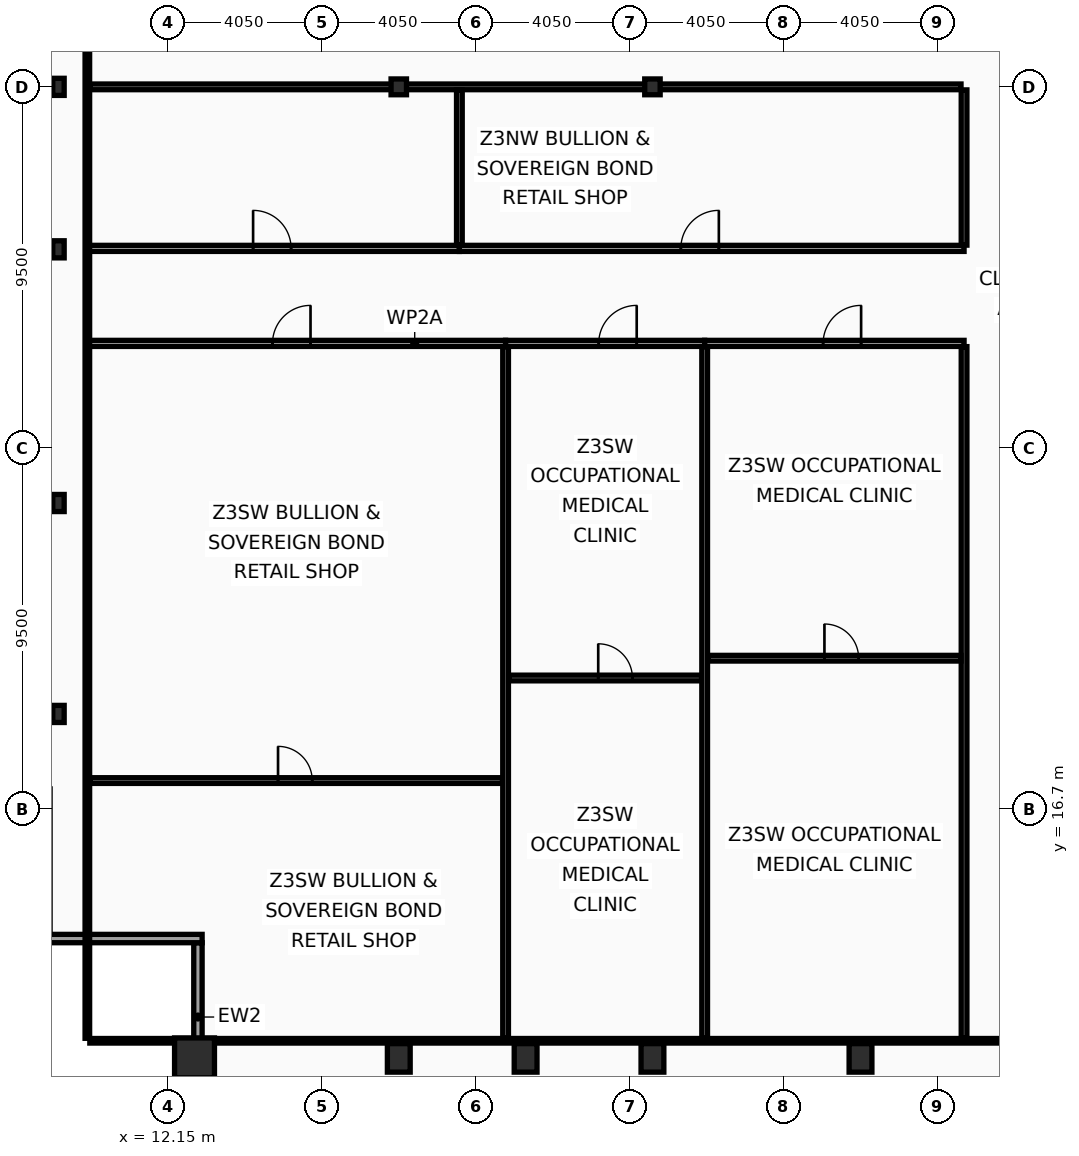
"""IFC4 building model, lengths in metres.
Left out: names, types, materials, properties, quantities, classifications, styles, units other than length and angle.
Written with IfcOpenShell. Run it as: python <this file> out.ifc"""

import sys

from ifc_helpers import new_model, si_unit, direction, frame, frame_2d, origin, origin_2d, place, context, subcontext, project, spatial, rectangle, hollow_rectangle, i_section, extrude, element, fill, save


model = new_model("IFC4")
c1 = context("Model", 3, precision=1e-05, world=origin(), true_north=direction((0.0, 1.0)))
c2 = subcontext(c1, "Body", "Model", "MODEL_VIEW")
j1 = project(units=[si_unit("LENGTHUNIT", "METRE"), si_unit("PLANEANGLEUNIT", "RADIAN")], contexts=[c1])
p1 = place(None, origin())
s1 = spatial("IfcSite", under=j1, at=p1, CompositionType="ELEMENT")
p2 = place(p1, origin())
s2 = spatial("IfcBuilding", under=s1, at=p2, CompositionType="ELEMENT")
p3 = place(p2, frame((0.0, 0.0, 253.4)))
s3 = spatial("IfcBuildingStorey", under=s2, at=p3, CompositionType="ELEMENT", Elevation=253.4)
p4 = place(p3, frame((12.85, 10.15, 0.0), z_axis=(0.0, 0.0, 1.0), x_axis=(1.0, 0.0, 0.0)))
e1 = element("IfcColumn", 1, at=p4, inside=s3, PredefinedType="COLUMN", context=c2, shape_type="SweptSolid", body=[
    extrude(hollow_rectangle(XDim=1.05, YDim=1.05, WallThickness=0.055, at=origin_2d()), origin(), (0.0, 0.0, 1.0), 3.6),
])
for number, where, z_axis, x_axis in (
    (2, (18.225, 10.15, 0.0), (0.0, 0.0, 1.0), (1.0, 0.0, 0.0)),
    (3, (21.562, 10.15, 0.0), (0.0, 0.0, 1.0), (1.0, 0.0, 0.0)),
    (4, (24.9, 10.15, 0.0), (0.0, 0.0, 1.0), (1.0, 0.0, 0.0)),
    (5, (30.375, 10.15, 0.0), (0.0, 0.0, 1.0), (1.0, 0.0, 0.0)),
):
    element("IfcColumn", number, at=place(p3, frame(where, z_axis=z_axis, x_axis=x_axis)), inside=s3, PredefinedType="COLUMN", context=c2, shape_type="SweptSolid", body=[
        extrude(hollow_rectangle(XDim=0.6, YDim=0.75, WallThickness=0.045, at=origin_2d()), origin(), (0.0, 0.0, 1.0), 3.6),
    ])
for number, where, z_axis, x_axis in (
    (6, (9.27, 19.2, 0.0), (0.0, 0.0, 1.0), (1.0, 0.0, 0.0)),
    (7, (9.27, 24.75, 0.0), (0.0, 0.0, 1.0), (1.0, 0.0, 0.0)),
    (8, (9.27, 31.425, 0.0), (0.0, 0.0, 1.0), (1.0, 0.0, 0.0)),
    (9, (9.27, 35.7, 0.0), (0.0, 0.0, 1.0), (1.0, 0.0, 0.0)),
):
    element("IfcColumn", number, at=place(p3, frame(where, z_axis=z_axis, x_axis=x_axis)), inside=s3, PredefinedType="COLUMN", context=c2, shape_type="SweptSolid", body=[
        extrude(i_section(OverallWidth=0.3, OverallDepth=0.45, WebThickness=0.014, FlangeThickness=0.026, at=origin_2d()), origin(), (0.0, 0.0, 1.0), 3.6),
    ])
for number, where, z_axis, x_axis in (
    (10, (18.225, 35.7, 0.0), (0.0, 0.0, 1.0), (1.0, 0.0, 0.0)),
    (11, (24.9, 35.7, 0.0), (0.0, 0.0, 1.0), (1.0, 0.0, 0.0)),
):
    element("IfcColumn", number, at=place(p3, frame(where, z_axis=z_axis, x_axis=x_axis)), inside=s3, PredefinedType="COLUMN", context=c2, shape_type="SweptSolid", body=[
        extrude(i_section(OverallWidth=0.406, OverallDepth=0.416, WebThickness=0.03, FlangeThickness=0.048, at=origin_2d()), origin(), (0.0, 0.0, 1.0), 3.6),
    ])
p5 = place(p3, frame((12.94, 9.27, 0.0), z_axis=(0.0, 0.0, 1.0), x_axis=(0.0, 1.0, 0.0)))
e12 = element("IfcWall", 12, at=p5, inside=s3, PredefinedType="SOLIDWALL", context=c2, shape_type="SweptSolid", body=[
    extrude(rectangle(XDim=3.91, YDim=0.22, at=frame_2d((1.955, 0.0))), origin(), (0.0, 0.0, 1.0), 2.77),
])
p6 = place(p3, frame((13.05, 13.29, 0.0), z_axis=(0.0, 0.0, 1.0), x_axis=(-1.0, 0.0, 0.0)))
e13 = element("IfcWall", 13, at=p6, inside=s3, PredefinedType="SOLIDWALL", context=c2, shape_type="SweptSolid", body=[
    extrude(rectangle(XDim=4.22, YDim=0.22, at=frame_2d((2.11, 0.0))), origin(), (0.0, 0.0, 1.0), 2.77),
])
p7 = place(p3, frame((33.1, 10.665, 0.0), z_axis=(0.0, 0.0, 1.0), x_axis=(0.0, 1.0, 0.0)))
e14 = element("IfcWall", 14, at=p7, inside=s3, PredefinedType="PARTITIONING", context=c2, shape_type="SweptSolid", body=[
    extrude(rectangle(XDim=18.2, YDim=0.15, at=frame_2d((9.1, 0.0))), origin(), (0.0, 0.0, 1.0), 2.97),
])
p8 = place(p3, frame((33.1, 31.535, 0.0), z_axis=(0.0, 0.0, 1.0), x_axis=(0.0, 1.0, 0.0)))
e15 = element("IfcWall", 15, at=p8, inside=s3, PredefinedType="PARTITIONING", context=c2, shape_type="SweptSolid", body=[
    extrude(rectangle(XDim=4.085, YDim=0.15, at=frame_2d((2.042, 0.0))), origin(), (0.0, 0.0, 1.0), 2.97),
])
p9 = place(p3, frame((10.095, 35.7, 0.0), z_axis=(0.0, 0.0, 1.0), x_axis=(1.0, 0.0, 0.0)))
e16 = element("IfcWall", 16, at=p9, inside=s3, PredefinedType="PARTITIONING", context=c2, shape_type="SweptSolid", body=[
    extrude(rectangle(XDim=22.925, YDim=0.15, at=frame_2d((11.462, 0.0))), origin(), (0.0, 0.0, 1.0), 2.72),
])
p10 = place(p3, frame((10.03, 28.95, 0.0), z_axis=(0.0, 0.0, 1.0), x_axis=(1.0, 0.0, 0.0)))
e17 = element("IfcWall", 17, at=p10, inside=s3, PredefinedType="PARTITIONING", context=c2, shape_type="SweptSolid", body=[
    extrude(rectangle(XDim=11.006, YDim=0.16, at=frame_2d((5.503, 0.0))), origin(), (0.0, 0.0, 1.0), 2.72),
])
p11 = place(p10, frame((4.873, 0.0, 0.0)))
e18 = element("IfcOpeningElement", 18, at=p11, cuts=e17, PredefinedType="OPENING", context=c2, shape_type="SweptSolid", body=[
    extrude(rectangle(XDim=1.0, YDim=2.05, at=frame_2d((0.5, 1.025))), frame((0.0, 0.09, 0.0), z_axis=(0.0, -1.0, 0.0), x_axis=(1.0, 0.0, 0.0)), (0.0, 0.0, 1.0), 0.18),
])
p12 = place(p3, frame((10.095, 17.447, 0.0), z_axis=(0.0, 0.0, 1.0), x_axis=(1.0, 0.0, 0.0)))
e19 = element("IfcWall", 19, at=p12, inside=s3, PredefinedType="PARTITIONING", context=c2, shape_type="SweptSolid", body=[
    extrude(rectangle(XDim=10.861, YDim=0.15, at=frame_2d((5.43, 0.0))), origin(), (0.0, 0.0, 1.0), 2.72),
])
p13 = place(p12, frame((4.953, 0.0, 0.0)))
e20 = element("IfcOpeningElement", 20, at=p13, cuts=e19, PredefinedType="OPENING", context=c2, shape_type="SweptSolid", body=[
    extrude(rectangle(XDim=0.9, YDim=2.05, at=frame_2d((0.45, 1.025))), frame((0.0, 0.085, 0.0), z_axis=(0.0, -1.0, 0.0), x_axis=(1.0, 0.0, 0.0)), (0.0, 0.0, 1.0), 0.17),
])
p14 = place(p3, frame((21.036, 28.95, 0.0), z_axis=(0.0, 0.0, 1.0), x_axis=(1.0, 0.0, 0.0)))
e21 = element("IfcWall", 21, at=p14, inside=s3, PredefinedType="PARTITIONING", context=c2, shape_type="SweptSolid", body=[
    extrude(rectangle(XDim=5.238, YDim=0.16, at=frame_2d((2.619, 0.0))), origin(), (0.0, 0.0, 1.0), 2.72),
])
p15 = place(p14, frame((2.45, 0.0, 0.0)))
e22 = element("IfcOpeningElement", 22, at=p15, cuts=e21, PredefinedType="OPENING", context=c2, shape_type="SweptSolid", body=[
    extrude(rectangle(XDim=1.0, YDim=2.05, at=frame_2d((0.5, 1.025))), frame((0.0, 0.09, 0.0), z_axis=(0.0, -1.0, 0.0), x_axis=(1.0, 0.0, 0.0)), (0.0, 0.0, 1.0), 0.18),
])
p16 = place(p3, frame((21.036, 10.665, 0.0), z_axis=(0.0, 0.0, 1.0), x_axis=(0.0, 1.0, 0.0)))
e23 = element("IfcWall", 23, at=p16, inside=s3, PredefinedType="PARTITIONING", context=c2, shape_type="SweptSolid", body=[
    extrude(rectangle(XDim=18.2, YDim=0.15, at=frame_2d((9.1, 0.0))), origin(), (0.0, 0.0, 1.0), 2.97),
])
p17 = place(p3, frame((21.116, 20.146, 0.0), z_axis=(0.0, 0.0, 1.0), x_axis=(1.0, 0.0, 0.0)))
e24 = element("IfcWall", 24, at=p17, inside=s3, PredefinedType="PARTITIONING", context=c2, shape_type="SweptSolid", body=[
    extrude(rectangle(XDim=5.078, YDim=0.15, at=frame_2d((2.539, 0.0))), origin(), (0.0, 0.0, 1.0), 2.72),
])
p18 = place(p17, frame((2.357, 0.0, 0.0)))
e25 = element("IfcOpeningElement", 25, at=p18, cuts=e24, PredefinedType="OPENING", context=c2, shape_type="SweptSolid", body=[
    extrude(rectangle(XDim=0.9, YDim=2.05, at=frame_2d((0.45, 1.025))), frame((0.0, 0.085, 0.0), z_axis=(0.0, -1.0, 0.0), x_axis=(1.0, 0.0, 0.0)), (0.0, 0.0, 1.0), 0.17),
])
p19 = place(p3, frame((26.274, 28.95, 0.0), z_axis=(0.0, 0.0, 1.0), x_axis=(1.0, 0.0, 0.0)))
e26 = element("IfcWall", 26, at=p19, inside=s3, PredefinedType="PARTITIONING", context=c2, shape_type="SweptSolid", body=[
    extrude(rectangle(XDim=6.826, YDim=0.16, at=frame_2d((3.413, 0.0))), origin(), (0.0, 0.0, 1.0), 2.72),
])
p20 = place(p19, frame((3.117, 0.0, 0.0)))
e27 = element("IfcOpeningElement", 27, at=p20, cuts=e26, PredefinedType="OPENING", context=c2, shape_type="SweptSolid", body=[
    extrude(rectangle(XDim=1.0, YDim=2.05, at=frame_2d((0.5, 1.025))), frame((0.0, 0.09, 0.0), z_axis=(0.0, -1.0, 0.0), x_axis=(1.0, 0.0, 0.0)), (0.0, 0.0, 1.0), 0.18),
])
p21 = place(p3, frame((26.274, 10.665, 0.0), z_axis=(0.0, 0.0, 1.0), x_axis=(0.0, 1.0, 0.0)))
e28 = element("IfcWall", 28, at=p21, inside=s3, PredefinedType="PARTITIONING", context=c2, shape_type="SweptSolid", body=[
    extrude(rectangle(XDim=18.2, YDim=0.15, at=frame_2d((9.1, 0.0))), origin(), (0.0, 0.0, 1.0), 2.97),
])
p22 = place(p3, frame((26.354, 20.667, 0.0), z_axis=(0.0, 0.0, 1.0), x_axis=(1.0, 0.0, 0.0)))
e29 = element("IfcWall", 29, at=p22, inside=s3, PredefinedType="PARTITIONING", context=c2, shape_type="SweptSolid", body=[
    extrude(rectangle(XDim=6.666, YDim=0.15, at=frame_2d((3.333, 0.0))), origin(), (0.0, 0.0, 1.0), 2.72),
])
p23 = place(p22, frame((3.072, 0.0, 0.0)))
e30 = element("IfcOpeningElement", 30, at=p23, cuts=e29, PredefinedType="OPENING", context=c2, shape_type="SweptSolid", body=[
    extrude(rectangle(XDim=0.9, YDim=2.05, at=frame_2d((0.45, 1.025))), frame((0.0, 0.085, 0.0), z_axis=(0.0, -1.0, 0.0), x_axis=(1.0, 0.0, 0.0)), (0.0, 0.0, 1.0), 0.17),
])
p24 = place(p3, frame((10.03, 31.45, 0.0), z_axis=(0.0, 0.0, 1.0), x_axis=(1.0, 0.0, 0.0)))
e31 = element("IfcWall", 31, at=p24, inside=s3, PredefinedType="PARTITIONING", context=c2, shape_type="SweptSolid", body=[
    extrude(rectangle(XDim=9.79, YDim=0.16, at=frame_2d((4.895, 0.0))), origin(), (0.0, 0.0, 1.0), 2.72),
])
p25 = place(p24, frame((4.362, 0.0, 0.0)))
e32 = element("IfcOpeningElement", 32, at=p25, cuts=e31, PredefinedType="OPENING", context=c2, shape_type="SweptSolid", body=[
    extrude(rectangle(XDim=1.0, YDim=2.05, at=frame_2d((0.5, 1.025))), frame((0.0, 0.09, 0.0), z_axis=(0.0, -1.0, 0.0), x_axis=(1.0, 0.0, 0.0)), (0.0, 0.0, 1.0), 0.18),
])
p26 = place(p3, frame((19.82, 31.45, 0.0), z_axis=(0.0, 0.0, 1.0), x_axis=(1.0, 0.0, 0.0)))
e33 = element("IfcWall", 33, at=p26, inside=s3, PredefinedType="PARTITIONING", context=c2, shape_type="SweptSolid", body=[
    extrude(rectangle(XDim=13.281, YDim=0.16, at=frame_2d((6.64, 0.0))), origin(), (0.0, 0.0, 1.0), 2.72),
])
p27 = place(p26, frame((5.828, 0.0, 0.0)))
e34 = element("IfcOpeningElement", 34, at=p27, cuts=e33, PredefinedType="OPENING", context=c2, shape_type="SweptSolid", body=[
    extrude(rectangle(XDim=1.0, YDim=2.05, at=frame_2d((0.5, 1.025))), frame((0.0, 0.09, 0.0), z_axis=(0.0, -1.0, 0.0), x_axis=(1.0, 0.0, 0.0)), (0.0, 0.0, 1.0), 0.18),
])
p28 = place(p3, frame((19.82, 31.535, 0.0), z_axis=(0.0, 0.0, 1.0), x_axis=(0.0, 1.0, 0.0)))
e35 = element("IfcWall", 35, at=p28, inside=s3, PredefinedType="PARTITIONING", context=c2, shape_type="SweptSolid", body=[
    extrude(rectangle(XDim=4.085, YDim=0.15, at=frame_2d((2.042, 0.0))), origin(), (0.0, 0.0, 1.0), 2.97),
])
p29 = place(p3, frame((10.03, 10.665, 0.0), z_axis=(0.0, 0.0, 1.0), x_axis=(0.0, 1.0, 0.0)))
e36 = element("IfcWall", 36, at=p29, inside=s3, PredefinedType="PARTITIONING", context=c2, shape_type="SweptSolid", body=[
    extrude(rectangle(XDim=42.11, YDim=0.12, at=frame_2d((21.055, 0.0))), origin(), (0.0, 0.0, 1.0), 2.72),
])
p30 = place(p3, frame((10.095, 10.6, 0.0), z_axis=(0.0, 0.0, 1.0), x_axis=(1.0, 0.0, 0.0)))
e37 = element("IfcWall", 37, at=p30, inside=s3, PredefinedType="PARTITIONING", context=c2, shape_type="SweptSolid", body=[
    extrude(rectangle(XDim=52.71, YDim=0.12, at=frame_2d((26.355, 0.0))), origin(), (0.0, 0.0, 1.0), 2.72),
])
p31 = place(p11, origin())
e38 = element("IfcDoor", 38, at=p31, inside=s3, OperationType="SINGLE_SWING_RIGHT", PredefinedType="DOOR", context=c2, shape_type="SweptSolid", body=[
    extrude(rectangle(XDim=1.0, YDim=2.05, at=frame_2d((0.5, 1.025))), frame((0.0, 0.025, 0.0), z_axis=(0.0, -1.0, 0.0), x_axis=(1.0, 0.0, 0.0)), (0.0, 0.0, 1.0), 0.05),
])
fill(e18, e38)
p32 = place(p13, origin())
e39 = element("IfcDoor", 39, at=p32, inside=s3, OperationType="SINGLE_SWING_LEFT", PredefinedType="DOOR", context=c2, shape_type="SweptSolid", body=[
    extrude(rectangle(XDim=0.9, YDim=2.05, at=frame_2d((0.45, 1.025))), frame((0.0, 0.025, 0.0), z_axis=(0.0, -1.0, 0.0), x_axis=(1.0, 0.0, 0.0)), (0.0, 0.0, 1.0), 0.05),
])
fill(e20, e39)
p33 = place(p15, origin())
e40 = element("IfcDoor", 40, at=p33, inside=s3, OperationType="SINGLE_SWING_RIGHT", PredefinedType="DOOR", context=c2, shape_type="SweptSolid", body=[
    extrude(rectangle(XDim=1.0, YDim=2.05, at=frame_2d((0.5, 1.025))), frame((0.0, 0.025, 0.0), z_axis=(0.0, -1.0, 0.0), x_axis=(1.0, 0.0, 0.0)), (0.0, 0.0, 1.0), 0.05),
])
fill(e22, e40)
p34 = place(p18, origin())
e41 = element("IfcDoor", 41, at=p34, inside=s3, OperationType="SINGLE_SWING_LEFT", PredefinedType="DOOR", context=c2, shape_type="SweptSolid", body=[
    extrude(rectangle(XDim=0.9, YDim=2.05, at=frame_2d((0.45, 1.025))), frame((0.0, 0.025, 0.0), z_axis=(0.0, -1.0, 0.0), x_axis=(1.0, 0.0, 0.0)), (0.0, 0.0, 1.0), 0.05),
])
fill(e25, e41)
p35 = place(p20, origin())
e42 = element("IfcDoor", 42, at=p35, inside=s3, OperationType="SINGLE_SWING_RIGHT", PredefinedType="DOOR", context=c2, shape_type="SweptSolid", body=[
    extrude(rectangle(XDim=1.0, YDim=2.05, at=frame_2d((0.5, 1.025))), frame((0.0, 0.025, 0.0), z_axis=(0.0, -1.0, 0.0), x_axis=(1.0, 0.0, 0.0)), (0.0, 0.0, 1.0), 0.05),
])
fill(e27, e42)
p36 = place(p23, origin())
e43 = element("IfcDoor", 43, at=p36, inside=s3, OperationType="SINGLE_SWING_LEFT", PredefinedType="DOOR", context=c2, shape_type="SweptSolid", body=[
    extrude(rectangle(XDim=0.9, YDim=2.05, at=frame_2d((0.45, 1.025))), frame((0.0, 0.025, 0.0), z_axis=(0.0, -1.0, 0.0), x_axis=(1.0, 0.0, 0.0)), (0.0, 0.0, 1.0), 0.05),
])
fill(e30, e43)
p37 = place(p25, origin())
e44 = element("IfcDoor", 44, at=p37, inside=s3, OperationType="SINGLE_SWING_LEFT", PredefinedType="DOOR", context=c2, shape_type="SweptSolid", body=[
    extrude(rectangle(XDim=1.0, YDim=2.05, at=frame_2d((0.5, 1.025))), frame((0.0, 0.025, 0.0), z_axis=(0.0, -1.0, 0.0), x_axis=(1.0, 0.0, 0.0)), (0.0, 0.0, 1.0), 0.05),
])
fill(e32, e44)
p38 = place(p27, origin())
e45 = element("IfcDoor", 45, at=p38, inside=s3, OperationType="SINGLE_SWING_RIGHT", PredefinedType="DOOR", context=c2, shape_type="SweptSolid", body=[
    extrude(rectangle(XDim=1.0, YDim=2.05, at=frame_2d((0.5, 1.025))), frame((0.0, 0.025, 0.0), z_axis=(0.0, -1.0, 0.0), x_axis=(1.0, 0.0, 0.0)), (0.0, 0.0, 1.0), 0.05),
])
fill(e34, e45)
save(model, sys.argv[1])
